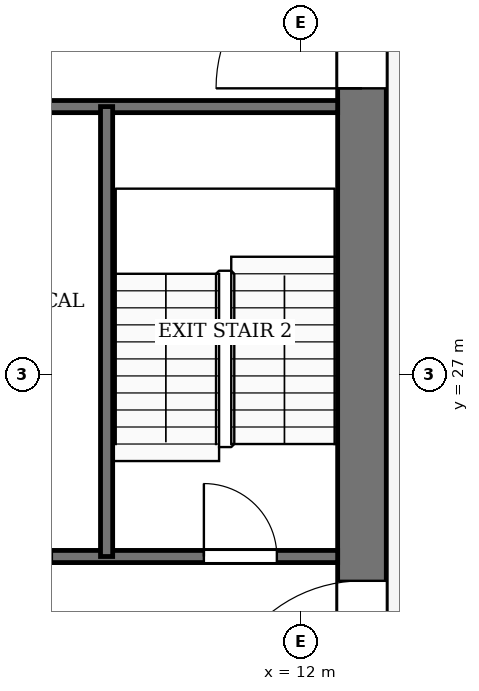
"""IFC4 building model, lengths in metres.
Left out: names, types, materials, properties, quantities, classifications, styles, units other than length and angle.
Written with IfcOpenShell. Run it as: python <this file> out.ifc"""

import sys

from ifc_helpers import new_model, si_unit, direction, frame, frame_2d, origin, place, context, subcontext, project, spatial, rectangle, extrude, element, fill, save


model = new_model("IFC4")
c1 = context("Model", 3, precision=1e-05, world=origin(), true_north=direction((0.0, 1.0)))
c2 = subcontext(c1, "Body", "Model", "MODEL_VIEW")
j1 = project(units=[si_unit("LENGTHUNIT", "METRE"), si_unit("PLANEANGLEUNIT", "RADIAN")], contexts=[c1])
p1 = place(None, origin())
s1 = spatial("IfcSite", under=j1, at=p1, CompositionType="ELEMENT")
p2 = place(p1, origin())
s2 = spatial("IfcBuilding", under=s1, at=p2, CompositionType="ELEMENT")
p3 = place(p2, frame((0.0, 0.0, 258.0)))
s3 = spatial("IfcBuildingStorey", under=s2, at=p3, CompositionType="ELEMENT", Elevation=258.0)
p4 = place(p3, frame((13.0, 18.4, -0.13), z_axis=(0.0, 0.0, 1.0), x_axis=(0.0, 1.0, 0.0)))
e1 = element("IfcWall", 1, at=p4, inside=s3, PredefinedType="SHEAR", context=c2, shape_type="SweptSolid", body=[
    extrude(rectangle(XDim=19.2, YDim=0.8, at=frame_2d((9.6, 0.0))), origin(), (0.0, 0.0, 1.0), 4.0),
])
p5 = place(p4, frame((2.8, 0.0, 0.13)))
e2 = element("IfcOpeningElement", 2, at=p5, cuts=e1, PredefinedType="OPENING", context=c2, shape_type="SweptSolid", body=[
    extrude(rectangle(XDim=2.4, YDim=2.4, at=frame_2d((1.2, 1.2))), frame((0.0, 0.41, 0.0), z_axis=(0.0, -1.0, 0.0), x_axis=(1.0, 0.0, 0.0)), (0.0, 0.0, 1.0), 0.82),
])
p6 = place(p4, frame((13.3, 0.0, 0.13)))
e3 = element("IfcOpeningElement", 3, at=p6, cuts=e1, PredefinedType="OPENING", context=c2, shape_type="SweptSolid", body=[
    extrude(rectangle(XDim=2.4, YDim=2.4, at=frame_2d((1.2, 1.2))), frame((0.0, 0.41, 0.0), z_axis=(0.0, -1.0, 0.0), x_axis=(1.0, 0.0, 0.0)), (0.0, 0.0, 1.0), 0.82),
])
p7 = place(p3, frame((6.0, 24.0, 0.0), z_axis=(0.0, 0.0, 1.0), x_axis=(1.0, 0.0, 0.0)))
e4 = element("IfcWall", 4, at=p7, inside=s3, PredefinedType="PARTITIONING", context=c2, shape_type="SweptSolid", body=[
    extrude(rectangle(XDim=6.6, YDim=0.2, at=frame_2d((3.3, 0.0))), origin(), (0.0, 0.0, 1.0), 3.87),
])
p8 = place(p7, frame((0.9, 0.0, 0.0)))
e5 = element("IfcOpeningElement", 5, at=p8, cuts=e4, PredefinedType="OPENING", context=c2, shape_type="SweptSolid", body=[
    extrude(rectangle(XDim=1.0, YDim=2.1, at=frame_2d((0.5, 1.05))), frame((0.0, 0.11, 0.0), z_axis=(0.0, -1.0, 0.0), x_axis=(1.0, 0.0, 0.0)), (0.0, 0.0, 1.0), 0.22),
])
p9 = place(p7, frame((4.4, 0.0, 0.0)))
e6 = element("IfcOpeningElement", 6, at=p9, cuts=e4, PredefinedType="OPENING", context=c2, shape_type="SweptSolid", body=[
    extrude(rectangle(XDim=1.2, YDim=2.2, at=frame_2d((0.6, 1.1))), frame((0.0, 0.11, 0.0), z_axis=(0.0, -1.0, 0.0), x_axis=(1.0, 0.0, 0.0)), (0.0, 0.0, 1.0), 0.22),
])
p10 = place(p3, frame((6.0, 31.4, 0.0), z_axis=(0.0, 0.0, 1.0), x_axis=(1.0, 0.0, 0.0)))
e7 = element("IfcWall", 7, at=p10, inside=s3, PredefinedType="PARTITIONING", context=c2, shape_type="SweptSolid", body=[
    extrude(rectangle(XDim=6.6, YDim=0.2, at=frame_2d((3.3, 0.0))), origin(), (0.0, 0.0, 1.0), 3.87),
])
p11 = place(p3, frame((8.8, 24.0, 0.0), z_axis=(0.0, 0.0, 1.0), x_axis=(0.0, 1.0, 0.0)))
e8 = element("IfcWall", 8, at=p11, inside=s3, PredefinedType="PARTITIONING", context=c2, shape_type="SweptSolid", body=[
    extrude(rectangle(XDim=7.4, YDim=0.2, at=frame_2d((3.7, 0.0))), origin(), (0.0, 0.0, 1.0), 3.87),
])
p12 = place(p9, origin())
e9 = element("IfcDoor", 9, at=p12, inside=s3, OperationType="SINGLE_SWING_LEFT", PredefinedType="DOOR", context=c2, shape_type="SweptSolid", body=[
    extrude(rectangle(XDim=1.2, YDim=2.2, at=frame_2d((0.6, 1.1))), frame((0.0, 0.025, 0.0), z_axis=(0.0, -1.0, 0.0), x_axis=(1.0, 0.0, 0.0)), (0.0, 0.0, 1.0), 0.05),
])
fill(e6, e9)
p13 = place(p5, origin())
e10 = element("IfcDoor", 10, at=p13, inside=s3, OperationType="DOUBLE_DOOR_SINGLE_SWING", PredefinedType="DOOR", context=c2, shape_type="SweptSolid", body=[
    extrude(rectangle(XDim=2.4, YDim=2.4, at=frame_2d((1.2, 1.2))), frame((0.0, 0.025, 0.0), z_axis=(0.0, -1.0, 0.0), x_axis=(1.0, 0.0, 0.0)), (0.0, 0.0, 1.0), 0.05),
])
fill(e2, e10)
p14 = place(p6, origin())
e11 = element("IfcDoor", 11, at=p14, inside=s3, OperationType="DOUBLE_DOOR_SINGLE_SWING", PredefinedType="DOOR", context=c2, shape_type="SweptSolid", body=[
    extrude(rectangle(XDim=2.4, YDim=2.4, at=frame_2d((1.2, 1.2))), frame((0.0, 0.025, 0.0), z_axis=(0.0, -1.0, 0.0), x_axis=(1.0, 0.0, 0.0)), (0.0, 0.0, 1.0), 0.05),
])
fill(e3, e11)
save(model, sys.argv[1])
